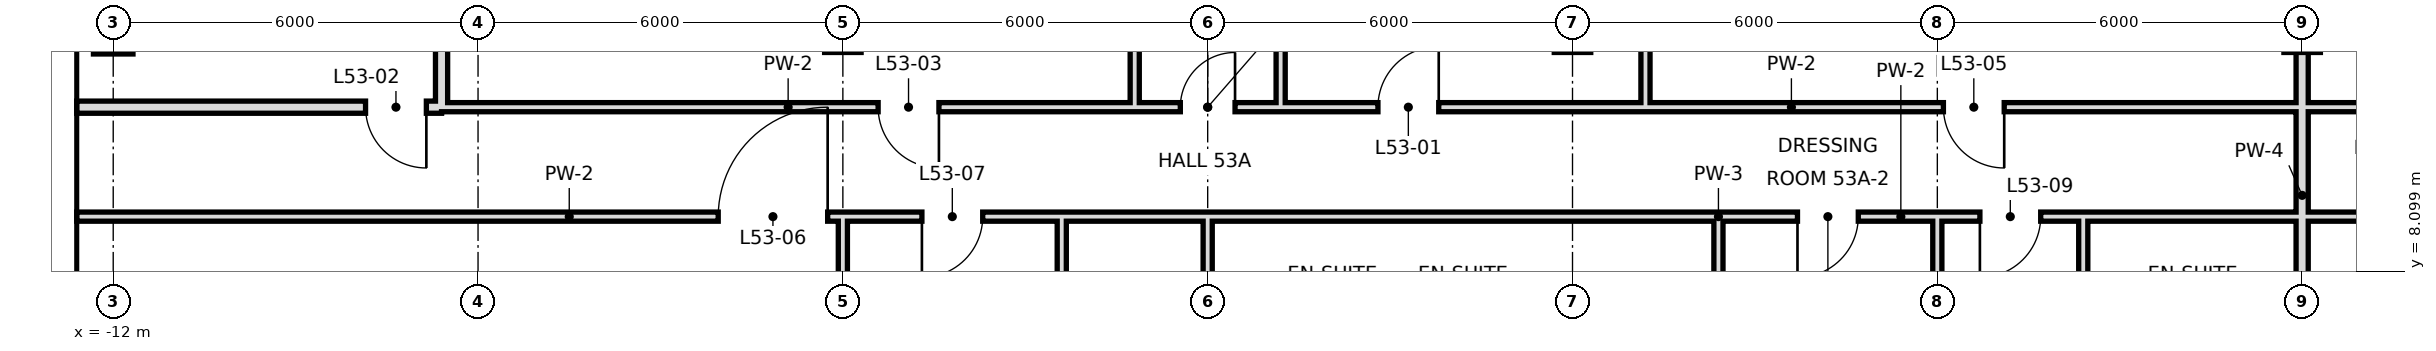
"""IFC4 building model, lengths in metres.
Left out: names, types, materials, properties, quantities, classifications, styles, units other than length and angle.
Written with IfcOpenShell. Run it as: python <this file> out.ifc"""

import sys

from ifc_helpers import new_model, si_unit, direction, frame, frame_2d, origin, origin_2d, place, context, subcontext, project, spatial, rectangle, hollow_rectangle, extrude, element, fill, save


model = new_model("IFC4")
c1 = context("Model", 3, precision=1e-05, world=origin(), true_north=direction((0.0, 1.0)))
c2 = subcontext(c1, "Body", "Model", "MODEL_VIEW")
j1 = project(units=[si_unit("LENGTHUNIT", "METRE"), si_unit("PLANEANGLEUNIT", "RADIAN")], contexts=[c1])
p1 = place(None, origin())
s1 = spatial("IfcSite", under=j1, at=p1, CompositionType="ELEMENT")
p2 = place(p1, origin())
s2 = spatial("IfcBuilding", under=s1, at=p2, CompositionType="ELEMENT")
p3 = place(p2, frame((0.0, 0.0, 226.2)))
s3 = spatial("IfcBuildingStorey", under=s2, at=p3, CompositionType="ELEMENT", Elevation=226.2)
p4 = place(p3, frame((-12.0, 12.0, 0.0), z_axis=(0.0, 0.0, 1.0), x_axis=(1.0, 0.0, 0.0)))
e1 = element("IfcColumn", 1, at=p4, inside=s3, PredefinedType="COLUMN", context=c2, shape_type="SweptSolid", body=[
    extrude(hollow_rectangle(XDim=0.65, YDim=0.65, WallThickness=0.032, at=origin_2d()), origin(), (0.0, 0.0, 1.0), 3.6),
])
p5 = place(p3, frame((-6.6, 10.8, 0.0), z_axis=(0.0, 0.0, 1.0), x_axis=(0.0, 1.0, 0.0)))
e2 = element("IfcWall", 2, at=p5, inside=s3, PredefinedType="SOLIDWALL", context=c2, shape_type="SweptSolid", body=[
    extrude(rectangle(XDim=7.2, YDim=0.2, at=frame_2d((3.6, 0.0))), origin(), (0.0, 0.0, 1.0), 2.72),
])
p6 = place(p3, frame((0.0, 0.0, 0.0), z_axis=(0.0, 0.0, 1.0), x_axis=(0.0, 1.0, 0.0)))
e3 = element("IfcWall", 3, at=p6, inside=s3, PredefinedType="PARTITIONING", context=c2, shape_type="SweptSolid", body=[
    extrude(rectangle(XDim=9.0, YDim=0.15, at=frame_2d((4.5, 0.0))), origin(), (0.0, 0.0, 1.0), 2.72),
])
p7 = place(p3, frame((13.2, 10.8, 0.0), z_axis=(0.0, 0.0, 1.0), x_axis=(0.0, 1.0, 0.0)))
e4 = element("IfcWall", 4, at=p7, inside=s3, PredefinedType="PARTITIONING", context=c2, shape_type="SweptSolid", body=[
    extrude(rectangle(XDim=7.9, YDim=0.15, at=frame_2d((3.95, 0.0))), origin(), (0.0, 0.0, 1.0), 3.42),
])
p8 = place(p3, frame((14.4, 6.0, 0.0), z_axis=(0.0, 0.0, 1.0), x_axis=(0.0, 1.0, 0.0)))
e5 = element("IfcWall", 5, at=p8, inside=s3, PredefinedType="PARTITIONING", context=c2, shape_type="SweptSolid", body=[
    extrude(rectangle(XDim=3.0, YDim=0.15, at=frame_2d((1.5, 0.0))), origin(), (0.0, 0.0, 1.0), 3.42),
])
p9 = place(p3, frame((18.0, -0.6, 0.0), z_axis=(0.0, 0.0, 1.0), x_axis=(0.0, 1.0, 0.0)))
e6 = element("IfcWall", 6, at=p9, inside=s3, PredefinedType="PARTITIONING", context=c2, shape_type="SweptSolid", body=[
    extrude(rectangle(XDim=9.6, YDim=0.15, at=frame_2d((4.8, 0.0))), origin(), (0.0, 0.0, 1.0), 2.72),
])
p10 = place(p3, frame((20.4, 6.0, 0.0), z_axis=(0.0, 0.0, 1.0), x_axis=(0.0, 1.0, 0.0)))
e7 = element("IfcWall", 7, at=p10, inside=s3, PredefinedType="PARTITIONING", context=c2, shape_type="SweptSolid", body=[
    extrude(rectangle(XDim=3.0, YDim=0.15, at=frame_2d((1.5, 0.0))), origin(), (0.0, 0.0, 1.0), 3.42),
])
p11 = place(p3, frame((24.0, 0.0, 0.0), z_axis=(0.0, 0.0, 1.0), x_axis=(0.0, 1.0, 0.0)))
e8 = element("IfcWall", 8, at=p11, inside=s3, PredefinedType="SOLIDWALL", context=c2, shape_type="SweptSolid", body=[
    extrude(rectangle(XDim=18.7, YDim=0.2, at=frame_2d((9.35, 0.0))), origin(), (0.0, 0.0, 1.0), 2.72),
])
p12 = place(p3, frame((3.6, 6.0, 0.0), z_axis=(0.0, 0.0, 1.0), x_axis=(0.0, 1.0, 0.0)))
e9 = element("IfcWall", 9, at=p12, inside=s3, PredefinedType="PARTITIONING", context=c2, shape_type="SweptSolid", body=[
    extrude(rectangle(XDim=3.0, YDim=0.15, at=frame_2d((1.5, 0.0))), origin(), (0.0, 0.0, 1.0), 3.42),
])
p13 = place(p3, frame((4.8, 10.8, 0.0), z_axis=(0.0, 0.0, 1.0), x_axis=(0.0, 1.0, 0.0)))
e10 = element("IfcWall", 10, at=p13, inside=s3, PredefinedType="PARTITIONING", context=c2, shape_type="SweptSolid", body=[
    extrude(rectangle(XDim=7.9, YDim=0.15, at=frame_2d((3.95, 0.0))), origin(), (0.0, 0.0, 1.0), 3.42),
])
p14 = place(p3, frame((6.0, 6.0, 0.0), z_axis=(0.0, 0.0, 1.0), x_axis=(0.0, 1.0, 0.0)))
e11 = element("IfcWall", 11, at=p14, inside=s3, PredefinedType="PARTITIONING", context=c2, shape_type="SweptSolid", body=[
    extrude(rectangle(XDim=3.0, YDim=0.15, at=frame_2d((1.5, 0.0))), origin(), (0.0, 0.0, 1.0), 2.72),
])
p15 = place(p3, frame((7.2, 10.8, 0.0), z_axis=(0.0, 0.0, 1.0), x_axis=(0.0, 1.0, 0.0)))
e12 = element("IfcWall", 12, at=p15, inside=s3, PredefinedType="PARTITIONING", context=c2, shape_type="SweptSolid", body=[
    extrude(rectangle(XDim=7.9, YDim=0.15, at=frame_2d((3.95, 0.0))), origin(), (0.0, 0.0, 1.0), 3.42),
])
p16 = place(p3, frame((-12.6, 10.8, 0.0), z_axis=(0.0, 0.0, 1.0), x_axis=(1.0, 0.0, 0.0)))
e13 = element("IfcWall", 13, at=p16, inside=s3, PredefinedType="SOLIDWALL", context=c2, shape_type="SweptSolid", body=[
    extrude(rectangle(XDim=6.0, YDim=0.2, at=frame_2d((3.0, 0.0))), origin(), (0.0, 0.0, 1.0), 2.97),
])
p17 = place(p16, frame((4.75, 0.0, 0.0)))
e14 = element("IfcOpeningElement", 14, at=p17, cuts=e13, PredefinedType="OPENING", context=c2, shape_type="SweptSolid", body=[
    extrude(rectangle(XDim=1.0, YDim=2.4, at=frame_2d((0.5, 1.2))), frame((0.0, 0.11, 0.0), z_axis=(0.0, -1.0, 0.0), x_axis=(1.0, 0.0, 0.0)), (0.0, 0.0, 1.0), 0.22),
])
p18 = place(p3, frame((-6.6, 10.8, 0.0), z_axis=(0.0, 0.0, 1.0), x_axis=(1.0, 0.0, 0.0)))
e15 = element("IfcWall", 15, at=p18, inside=s3, PredefinedType="PARTITIONING", context=c2, shape_type="SweptSolid", body=[
    extrude(rectangle(XDim=11.4, YDim=0.15, at=frame_2d((5.7, 0.0))), origin(), (0.0, 0.0, 1.0), 3.42),
])
p19 = place(p18, frame((7.18, 0.0, 0.0)))
e16 = element("IfcOpeningElement", 16, at=p19, cuts=e15, PredefinedType="OPENING", context=c2, shape_type="SweptSolid", body=[
    extrude(rectangle(XDim=1.0, YDim=2.4, at=frame_2d((0.5, 1.2))), frame((0.0, 0.085, 0.0), z_axis=(0.0, -1.0, 0.0), x_axis=(1.0, 0.0, 0.0)), (0.0, 0.0, 1.0), 0.17),
])
p20 = place(p3, frame((7.2, 10.8, 0.0), z_axis=(0.0, 0.0, 1.0), x_axis=(1.0, 0.0, 0.0)))
e17 = element("IfcWall", 17, at=p20, inside=s3, PredefinedType="PARTITIONING", context=c2, shape_type="SweptSolid", body=[
    extrude(rectangle(XDim=16.8, YDim=0.15, at=frame_2d((8.4, 0.0))), origin(), (0.0, 0.0, 1.0), 3.42),
])
p21 = place(p20, frame((1.6, 0.0, 0.0)))
e18 = element("IfcOpeningElement", 18, at=p21, cuts=e17, PredefinedType="OPENING", context=c2, shape_type="SweptSolid", body=[
    extrude(rectangle(XDim=1.0, YDim=2.4, at=frame_2d((0.5, 1.2))), frame((0.0, 0.085, 0.0), z_axis=(0.0, -1.0, 0.0), x_axis=(1.0, 0.0, 0.0)), (0.0, 0.0, 1.0), 0.17),
])
p22 = place(p20, frame((10.9, 0.0, 0.0)))
e19 = element("IfcOpeningElement", 19, at=p22, cuts=e17, PredefinedType="OPENING", context=c2, shape_type="SweptSolid", body=[
    extrude(rectangle(XDim=1.0, YDim=2.4, at=frame_2d((0.5, 1.2))), frame((0.0, 0.085, 0.0), z_axis=(0.0, -1.0, 0.0), x_axis=(1.0, 0.0, 0.0)), (0.0, 0.0, 1.0), 0.17),
])
p23 = place(p3, frame((4.8, 10.8, 0.0), z_axis=(0.0, 0.0, 1.0), x_axis=(1.0, 0.0, 0.0)))
e20 = element("IfcWall", 20, at=p23, inside=s3, PredefinedType="PARTITIONING", context=c2, shape_type="SweptSolid", body=[
    extrude(rectangle(XDim=2.4, YDim=0.15, at=frame_2d((1.2, 0.0))), origin(), (0.0, 0.0, 1.0), 3.42),
])
p24 = place(p23, frame((0.75, 0.0, 0.0)))
e21 = element("IfcOpeningElement", 21, at=p24, cuts=e20, PredefinedType="OPENING", context=c2, shape_type="SweptSolid", body=[
    extrude(rectangle(XDim=0.9, YDim=2.4, at=frame_2d((0.45, 1.2))), frame((0.0, 0.085, 0.0), z_axis=(0.0, -1.0, 0.0), x_axis=(1.0, 0.0, 0.0)), (0.0, 0.0, 1.0), 0.17),
])
p25 = place(p3, frame((24.0, 10.8, 0.0), z_axis=(0.0, 0.0, 1.0), x_axis=(1.0, 0.0, 0.0)))
e22 = element("IfcWall", 22, at=p25, inside=s3, PredefinedType="PARTITIONING", context=c2, shape_type="SweptSolid", body=[
    extrude(rectangle(XDim=2.4, YDim=0.15, at=frame_2d((1.2, 0.0))), origin(), (0.0, 0.0, 1.0), 3.42),
])
p26 = place(p25, frame((0.95, 0.0, 0.0)))
e23 = element("IfcOpeningElement", 23, at=p26, cuts=e22, PredefinedType="OPENING", context=c2, shape_type="SweptSolid", body=[
    extrude(rectangle(XDim=0.9, YDim=2.4, at=frame_2d((0.45, 1.2))), frame((0.0, 0.085, 0.0), z_axis=(0.0, -1.0, 0.0), x_axis=(1.0, 0.0, 0.0)), (0.0, 0.0, 1.0), 0.17),
])
p27 = place(p3, frame((-12.6, 9.0, 0.0), z_axis=(0.0, 0.0, 1.0), x_axis=(1.0, 0.0, 0.0)))
e24 = element("IfcWall", 24, at=p27, inside=s3, PredefinedType="PARTITIONING", context=c2, shape_type="SweptSolid", body=[
    extrude(rectangle(XDim=16.2, YDim=0.15, at=frame_2d((8.1, 0.0))), origin(), (0.0, 0.0, 1.0), 3.42),
])
p28 = place(p27, frame((10.55, 0.0, 0.0)))
e25 = element("IfcOpeningElement", 25, at=p28, cuts=e24, PredefinedType="OPENING", context=c2, shape_type="SweptSolid", body=[
    extrude(rectangle(XDim=1.8, YDim=2.4, at=frame_2d((0.9, 1.2))), frame((0.0, 0.085, 0.0), z_axis=(0.0, -1.0, 0.0), x_axis=(1.0, 0.0, 0.0)), (0.0, 0.0, 1.0), 0.17),
])
p29 = place(p27, frame((13.9, 0.0, 0.0)))
e26 = element("IfcOpeningElement", 26, at=p29, cuts=e24, PredefinedType="OPENING", context=c2, shape_type="SweptSolid", body=[
    extrude(rectangle(XDim=1.0, YDim=2.4, at=frame_2d((0.5, 1.2))), frame((0.0, 0.085, 0.0), z_axis=(0.0, -1.0, 0.0), x_axis=(1.0, 0.0, 0.0)), (0.0, 0.0, 1.0), 0.17),
])
p30 = place(p3, frame((14.4, 9.0, 0.0), z_axis=(0.0, 0.0, 1.0), x_axis=(1.0, 0.0, 0.0)))
e27 = element("IfcWall", 27, at=p30, inside=s3, PredefinedType="PARTITIONING", context=c2, shape_type="SweptSolid", body=[
    extrude(rectangle(XDim=6.0, YDim=0.15, at=frame_2d((3.0, 0.0))), origin(), (0.0, 0.0, 1.0), 3.42),
])
p31 = place(p30, frame((1.3, 0.0, 0.0)))
e28 = element("IfcOpeningElement", 28, at=p31, cuts=e27, PredefinedType="OPENING", context=c2, shape_type="SweptSolid", body=[
    extrude(rectangle(XDim=1.0, YDim=2.4, at=frame_2d((0.5, 1.2))), frame((0.0, 0.085, 0.0), z_axis=(0.0, -1.0, 0.0), x_axis=(1.0, 0.0, 0.0)), (0.0, 0.0, 1.0), 0.17),
])
p32 = place(p30, frame((4.3, 0.0, 0.0)))
e29 = element("IfcOpeningElement", 29, at=p32, cuts=e27, PredefinedType="OPENING", context=c2, shape_type="SweptSolid", body=[
    extrude(rectangle(XDim=1.0, YDim=2.4, at=frame_2d((0.5, 1.2))), frame((0.0, 0.085, 0.0), z_axis=(0.0, -1.0, 0.0), x_axis=(1.0, 0.0, 0.0)), (0.0, 0.0, 1.0), 0.17),
])
p33 = place(p3, frame((24.0, 9.0, 0.0), z_axis=(0.0, 0.0, 1.0), x_axis=(1.0, 0.0, 0.0)))
e30 = element("IfcWall", 30, at=p33, inside=s3, PredefinedType="PARTITIONING", context=c2, shape_type="SweptSolid", body=[
    extrude(rectangle(XDim=6.0, YDim=0.15, at=frame_2d((3.0, 0.0))), origin(), (0.0, 0.0, 1.0), 3.42),
])
p34 = place(p33, frame((2.1, 0.0, 0.0)))
e31 = element("IfcOpeningElement", 31, at=p34, cuts=e30, PredefinedType="OPENING", context=c2, shape_type="SweptSolid", body=[
    extrude(rectangle(XDim=1.8, YDim=2.4, at=frame_2d((0.9, 1.2))), frame((0.0, 0.085, 0.0), z_axis=(0.0, -1.0, 0.0), x_axis=(1.0, 0.0, 0.0)), (0.0, 0.0, 1.0), 0.17),
])
p35 = place(p3, frame((3.6, 9.0, 0.0), z_axis=(0.0, 0.0, 1.0), x_axis=(1.0, 0.0, 0.0)))
e32 = element("IfcWall", 32, at=p35, inside=s3, PredefinedType="PARTITIONING", context=c2, shape_type="SweptSolid", body=[
    extrude(rectangle(XDim=10.8, YDim=0.15, at=frame_2d((5.4, 0.0))), origin(), (0.0, 0.0, 1.0), 3.42),
])
p36 = place(p3, frame((20.4, 9.0, 0.0), z_axis=(0.0, 0.0, 1.0), x_axis=(1.0, 0.0, 0.0)))
e33 = element("IfcWall", 33, at=p36, inside=s3, PredefinedType="PARTITIONING", context=c2, shape_type="SweptSolid", body=[
    extrude(rectangle(XDim=3.6, YDim=0.15, at=frame_2d((1.8, 0.0))), origin(), (0.0, 0.0, 1.0), 3.42),
])
p37 = place(p21, frame((1.0, 0.0, 0.0), z_axis=(0.0, 0.0, 1.0), x_axis=(-1.0, 0.0, 0.0)))
e34 = element("IfcDoor", 34, at=p37, inside=s3, OperationType="SINGLE_SWING_LEFT", PredefinedType="DOOR", context=c2, shape_type="SweptSolid", body=[
    extrude(rectangle(XDim=1.0, YDim=2.4, at=frame_2d((0.5, 1.2))), frame((0.0, 0.025, 0.0), z_axis=(0.0, -1.0, 0.0), x_axis=(1.0, 0.0, 0.0)), (0.0, 0.0, 1.0), 0.05),
])
fill(e18, e34)
p38 = place(p17, origin())
e35 = element("IfcDoor", 35, at=p38, inside=s3, OperationType="SINGLE_SWING_RIGHT", PredefinedType="DOOR", context=c2, shape_type="SweptSolid", body=[
    extrude(rectangle(XDim=1.0, YDim=2.4, at=frame_2d((0.5, 1.2))), frame((0.0, 0.025, 0.0), z_axis=(0.0, -1.0, 0.0), x_axis=(1.0, 0.0, 0.0)), (0.0, 0.0, 1.0), 0.05),
])
fill(e14, e35)
p39 = place(p19, origin())
e36 = element("IfcDoor", 36, at=p39, inside=s3, OperationType="SINGLE_SWING_RIGHT", PredefinedType="DOOR", context=c2, shape_type="SweptSolid", body=[
    extrude(rectangle(XDim=1.0, YDim=2.4, at=frame_2d((0.5, 1.2))), frame((0.0, 0.025, 0.0), z_axis=(0.0, -1.0, 0.0), x_axis=(1.0, 0.0, 0.0)), (0.0, 0.0, 1.0), 0.05),
])
fill(e16, e36)
p40 = place(p24, frame((0.9, 0.0, 0.0), z_axis=(0.0, 0.0, 1.0), x_axis=(-1.0, 0.0, 0.0)))
e37 = element("IfcDoor", 37, at=p40, inside=s3, OperationType="SINGLE_SWING_LEFT", PredefinedType="DOOR", context=c2, shape_type="SweptSolid", body=[
    extrude(rectangle(XDim=0.9, YDim=2.4, at=frame_2d((0.45, 1.2))), frame((0.0, 0.025, 0.0), z_axis=(0.0, -1.0, 0.0), x_axis=(1.0, 0.0, 0.0)), (0.0, 0.0, 1.0), 0.05),
])
fill(e21, e37)
p41 = place(p22, origin())
e38 = element("IfcDoor", 38, at=p41, inside=s3, OperationType="SINGLE_SWING_RIGHT", PredefinedType="DOOR", context=c2, shape_type="SweptSolid", body=[
    extrude(rectangle(XDim=1.0, YDim=2.4, at=frame_2d((0.5, 1.2))), frame((0.0, 0.025, 0.0), z_axis=(0.0, -1.0, 0.0), x_axis=(1.0, 0.0, 0.0)), (0.0, 0.0, 1.0), 0.05),
])
fill(e19, e38)
p42 = place(p28, frame((1.8, 0.0, 0.0), z_axis=(0.0, 0.0, 1.0), x_axis=(-1.0, 0.0, 0.0)))
e39 = element("IfcDoor", 39, at=p42, inside=s3, OperationType="SINGLE_SWING_LEFT", PredefinedType="DOOR", context=c2, shape_type="SweptSolid", body=[
    extrude(rectangle(XDim=1.8, YDim=2.4, at=frame_2d((0.9, 1.2))), frame((0.0, 0.025, 0.0), z_axis=(0.0, -1.0, 0.0), x_axis=(1.0, 0.0, 0.0)), (0.0, 0.0, 1.0), 0.05),
])
fill(e25, e39)
p43 = place(p29, frame((1.0, 0.0, 0.0), z_axis=(0.0, 0.0, 1.0), x_axis=(-1.0, 0.0, 0.0)))
e40 = element("IfcDoor", 40, at=p43, inside=s3, OperationType="SINGLE_SWING_RIGHT", PredefinedType="DOOR", context=c2, shape_type="SweptSolid", body=[
    extrude(rectangle(XDim=1.0, YDim=2.4, at=frame_2d((0.5, 1.2))), frame((0.0, 0.025, 0.0), z_axis=(0.0, -1.0, 0.0), x_axis=(1.0, 0.0, 0.0)), (0.0, 0.0, 1.0), 0.05),
])
fill(e26, e40)
p44 = place(p31, frame((1.0, 0.0, 0.0), z_axis=(0.0, 0.0, 1.0), x_axis=(-1.0, 0.0, 0.0)))
e41 = element("IfcDoor", 41, at=p44, inside=s3, OperationType="SINGLE_SWING_RIGHT", PredefinedType="DOOR", context=c2, shape_type="SweptSolid", body=[
    extrude(rectangle(XDim=1.0, YDim=2.4, at=frame_2d((0.5, 1.2))), frame((0.0, 0.025, 0.0), z_axis=(0.0, -1.0, 0.0), x_axis=(1.0, 0.0, 0.0)), (0.0, 0.0, 1.0), 0.05),
])
fill(e28, e41)
p45 = place(p32, frame((1.0, 0.0, 0.0), z_axis=(0.0, 0.0, 1.0), x_axis=(-1.0, 0.0, 0.0)))
e42 = element("IfcDoor", 42, at=p45, inside=s3, OperationType="SINGLE_SWING_RIGHT", PredefinedType="DOOR", context=c2, shape_type="SweptSolid", body=[
    extrude(rectangle(XDim=1.0, YDim=2.4, at=frame_2d((0.5, 1.2))), frame((0.0, 0.025, 0.0), z_axis=(0.0, -1.0, 0.0), x_axis=(1.0, 0.0, 0.0)), (0.0, 0.0, 1.0), 0.05),
])
fill(e29, e42)
save(model, sys.argv[1])
